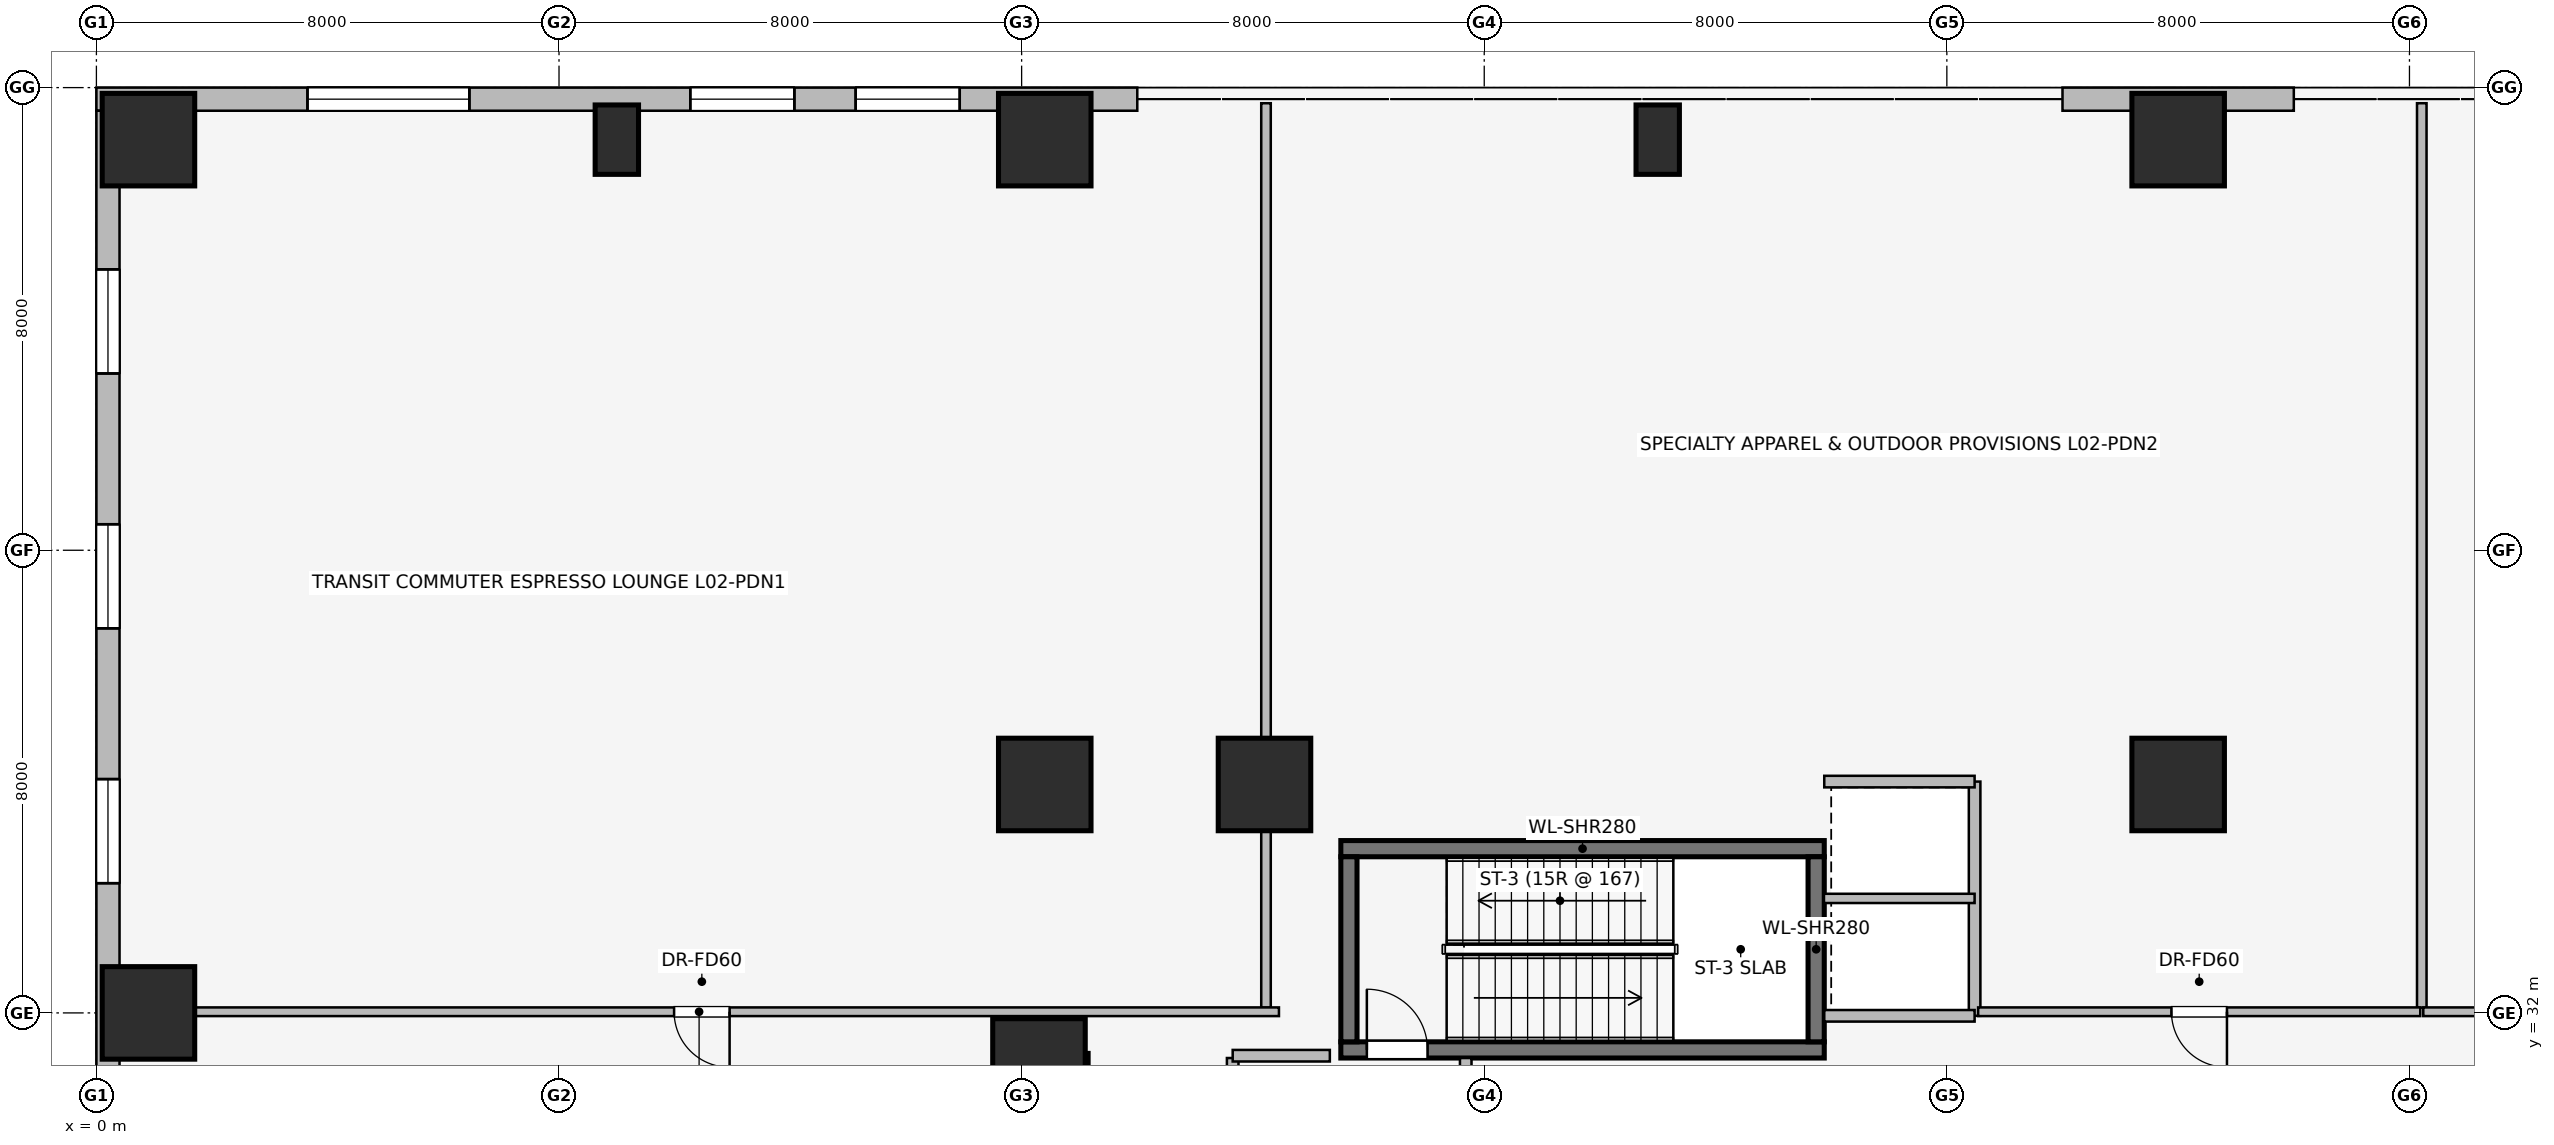
"""IFC4 building model, lengths in metres.
Left out: names, types, materials, properties, quantities, classifications, styles, units other than length and angle.
Written with IfcOpenShell. Run it as: python <this file> out.ifc"""

import sys

from ifc_helpers import new_model, si_unit, direction, frame, frame_2d, origin, origin_2d, place, context, subcontext, project, spatial, rectangle, extrude, element, fill, save


model = new_model("IFC4")
c1 = context("Model", 3, precision=1e-05, world=origin(), true_north=direction((0.0, 1.0)))
c2 = subcontext(c1, "Body", "Model", "MODEL_VIEW")
j1 = project(units=[si_unit("LENGTHUNIT", "METRE"), si_unit("PLANEANGLEUNIT", "RADIAN")], contexts=[c1])
p1 = place(None, origin())
s1 = spatial("IfcSite", under=j1, at=p1, CompositionType="ELEMENT")
p2 = place(p1, origin())
s2 = spatial("IfcBuilding", under=s1, at=p2, CompositionType="ELEMENT")
p3 = place(p2, frame((0.0, 0.0, 6.0)))
s3 = spatial("IfcBuildingStorey", under=s2, at=p3, CompositionType="ELEMENT", Elevation=6.0)
p4 = place(p3, frame((16.85, 25.68, 0.0), z_axis=(0.0, 0.0, 1.0), x_axis=(0.0, 1.0, 0.0)))
e1 = element("IfcWall", 1, at=p4, inside=s3, PredefinedType="SHEAR", context=c2, shape_type="SweptSolid", body=[
    extrude(rectangle(XDim=5.62, YDim=0.6, at=frame_2d((2.81, 0.0))), origin(), (0.0, 0.0, 1.0), 5.0),
])
p5 = place(p3, frame((21.52, 31.36, 0.0), z_axis=(0.0, 0.0, 1.0), x_axis=(1.0, 0.0, 0.0)))
e2 = element("IfcWall", 2, at=p5, inside=s3, PredefinedType="SHEAR", context=c2, shape_type="SweptSolid", body=[
    extrude(rectangle(XDim=8.36, YDim=0.28, at=frame_2d((4.18, 0.0))), origin(), (0.0, 0.0, 1.0), 5.0),
])
p6 = place(p5, frame((0.45, 0.0, 0.0)))
e3 = element("IfcOpeningElement", 3, at=p6, cuts=e2, PredefinedType="OPENING", context=c2, shape_type="SweptSolid", body=[
    extrude(rectangle(XDim=1.05, YDim=2.0, at=frame_2d((0.525, 1.0))), frame((0.0, 0.15, 0.0), z_axis=(0.0, -1.0, 0.0), x_axis=(1.0, 0.0, 0.0)), (0.0, 0.0, 1.0), 0.3),
])
p7 = place(p3, frame((29.88, 34.84, 0.0), z_axis=(0.0, 0.0, 1.0), x_axis=(-1.0, 0.0, 0.0)))
e4 = element("IfcWall", 4, at=p7, inside=s3, PredefinedType="SHEAR", context=c2, shape_type="SweptSolid", body=[
    extrude(rectangle(XDim=8.36, YDim=0.28, at=frame_2d((4.18, 0.0))), origin(), (0.0, 0.0, 1.0), 5.0),
])
for number, where, z_axis, x_axis in (
    (5, (21.66, 34.7, 0.0), (0.0, 0.0, 1.0), (0.0, -1.0, 0.0)),
    (6, (29.74, 31.5, 0.0), (0.0, 0.0, 1.0), (0.0, 1.0, 0.0)),
):
    element("IfcWall", number, at=place(p3, frame(where, z_axis=z_axis, x_axis=x_axis)), inside=s3, PredefinedType="SHEAR", context=c2, shape_type="SweptSolid", body=[
        extrude(rectangle(XDim=3.2, YDim=0.28, at=frame_2d((1.6, 0.0))), origin(), (0.0, 0.0, 1.0), 5.0),
    ])
for number, where, z_axis, x_axis in (
    (7, (16.3, 31.1, 0.0), (0.0, 0.0, 1.0), (1.0, 0.0, 0.0)),
    (8, (0.9, 47.1, 0.0), (0.0, 0.0, 1.0), (1.0, 0.0, 0.0)),
    (9, (16.4, 47.1, 0.0), (0.0, 0.0, 1.0), (1.0, 0.0, 0.0)),
    (10, (36.0, 47.1, 0.0), (0.0, 0.0, 1.0), (1.0, 0.0, 0.0)),
    (11, (0.9, 32.0, 0.0), (0.0, 0.0, 1.0), (1.0, 0.0, 0.0)),
    (12, (20.2, 35.95, 0.0), (0.0, 0.0, 1.0), (1.0, 0.0, 0.0)),
    (13, (16.4, 35.95, 0.0), (0.0, 0.0, 1.0), (1.0, 0.0, 0.0)),
    (14, (36.0, 35.95, 0.0), (0.0, 0.0, 1.0), (1.0, 0.0, 0.0)),
):
    element("IfcColumn", number, at=place(p3, frame(where, z_axis=z_axis, x_axis=x_axis)), inside=s3, PredefinedType="COLUMN", context=c2, shape_type="SweptSolid", body=[
        extrude(rectangle(XDim=1.6, YDim=1.6, at=origin_2d()), origin(), (0.0, 0.0, 1.0), 5.0),
    ])
for number, where, z_axis, x_axis in (
    (15, (9.0, 47.1, 0.0), (0.0, 0.0, 1.0), (1.0, 0.0, 0.0)),
    (16, (27.0, 47.1, 0.0), (0.0, 0.0, 1.0), (1.0, 0.0, 0.0)),
):
    element("IfcColumn", number, at=place(p3, frame(where, z_axis=z_axis, x_axis=x_axis)), inside=s3, PredefinedType="PILASTER", context=c2, shape_type="SweptSolid", body=[
        extrude(rectangle(XDim=0.75, YDim=1.2, at=origin_2d()), origin(), (0.0, 0.0, 1.0), 5.0),
    ])
p8 = place(p3, frame((0.0, 47.8, 0.0), z_axis=(0.0, 0.0, 1.0), x_axis=(1.0, 0.0, 0.0)))
e17 = element("IfcWall", 17, at=p8, inside=s3, PredefinedType="STANDARD", context=c2, shape_type="SweptSolid", body=[
    extrude(rectangle(XDim=18.0, YDim=0.4, at=frame_2d((9.0, 0.0))), origin(), (0.0, 0.0, 1.0), 4.69),
])
p9 = place(p8, frame((3.65, 0.0, 0.75)))
e18 = element("IfcOpeningElement", 18, at=p9, cuts=e17, PredefinedType="OPENING", context=c2, shape_type="SweptSolid", body=[
    extrude(rectangle(XDim=2.8, YDim=1.8, at=frame_2d((1.4, 0.9))), frame((0.0, 0.21, 0.0), z_axis=(0.0, -1.0, 0.0), x_axis=(1.0, 0.0, 0.0)), (0.0, 0.0, 1.0), 0.42),
])
p10 = place(p8, frame((10.27, 0.0, 0.75)))
e19 = element("IfcOpeningElement", 19, at=p10, cuts=e17, PredefinedType="OPENING", context=c2, shape_type="SweptSolid", body=[
    extrude(rectangle(XDim=1.8, YDim=1.5, at=frame_2d((0.9, 0.75))), frame((0.0, 0.21, 0.0), z_axis=(0.0, -1.0, 0.0), x_axis=(1.0, 0.0, 0.0)), (0.0, 0.0, 1.0), 0.42),
])
p11 = place(p8, frame((13.13, 0.0, 0.75)))
e20 = element("IfcOpeningElement", 20, at=p11, cuts=e17, PredefinedType="OPENING", context=c2, shape_type="SweptSolid", body=[
    extrude(rectangle(XDim=1.8, YDim=1.5, at=frame_2d((0.9, 0.75))), frame((0.0, 0.21, 0.0), z_axis=(0.0, -1.0, 0.0), x_axis=(1.0, 0.0, 0.0)), (0.0, 0.0, 1.0), 0.42),
])
p12 = place(p3, frame((34.0, 47.8, 0.0), z_axis=(0.0, 0.0, 1.0), x_axis=(1.0, 0.0, 0.0)))
e21 = element("IfcWall", 21, at=p12, inside=s3, PredefinedType="STANDARD", context=c2, shape_type="SweptSolid", body=[
    extrude(rectangle(XDim=4.0, YDim=0.4, at=frame_2d((2.0, 0.0))), origin(), (0.0, 0.0, 1.0), 4.69),
])
p13 = place(p3, frame((0.2, 24.0, 0.0), z_axis=(0.0, 0.0, 1.0), x_axis=(0.0, 1.0, 0.0)))
e22 = element("IfcWall", 22, at=p13, inside=s3, PredefinedType="STANDARD", context=c2, shape_type="SweptSolid", body=[
    extrude(rectangle(XDim=23.6, YDim=0.4, at=frame_2d((11.8, 0.0))), origin(), (0.0, 0.0, 1.0), 4.69),
])
p14 = place(p13, frame((0.778, 0.0, 0.75)))
e23 = element("IfcOpeningElement", 23, at=p14, cuts=e22, PredefinedType="OPENING", context=c2, shape_type="SweptSolid", body=[
    extrude(rectangle(XDim=2.8, YDim=1.8, at=frame_2d((1.4, 0.9))), frame((0.0, 0.21, 0.0), z_axis=(0.0, -1.0, 0.0), x_axis=(1.0, 0.0, 0.0)), (0.0, 0.0, 1.0), 0.42),
])
p15 = place(p13, frame((4.033, 0.0, 0.75)))
e24 = element("IfcOpeningElement", 24, at=p15, cuts=e22, PredefinedType="OPENING", context=c2, shape_type="SweptSolid", body=[
    extrude(rectangle(XDim=2.8, YDim=1.8, at=frame_2d((1.4, 0.9))), frame((0.0, 0.21, 0.0), z_axis=(0.0, -1.0, 0.0), x_axis=(1.0, 0.0, 0.0)), (0.0, 0.0, 1.0), 0.42),
])
p16 = place(p13, frame((10.243, 0.0, 0.75)))
e25 = element("IfcOpeningElement", 25, at=p16, cuts=e22, PredefinedType="OPENING", context=c2, shape_type="SweptSolid", body=[
    extrude(rectangle(XDim=1.8, YDim=1.5, at=frame_2d((0.9, 0.75))), frame((0.0, 0.21, 0.0), z_axis=(0.0, -1.0, 0.0), x_axis=(1.0, 0.0, 0.0)), (0.0, 0.0, 1.0), 0.42),
])
p17 = place(p13, frame((14.65, 0.0, 0.75)))
e26 = element("IfcOpeningElement", 26, at=p17, cuts=e22, PredefinedType="OPENING", context=c2, shape_type="SweptSolid", body=[
    extrude(rectangle(XDim=1.8, YDim=1.5, at=frame_2d((0.9, 0.75))), frame((0.0, 0.21, 0.0), z_axis=(0.0, -1.0, 0.0), x_axis=(1.0, 0.0, 0.0)), (0.0, 0.0, 1.0), 0.42),
])
p18 = place(p13, frame((19.057, 0.0, 0.75)))
e27 = element("IfcOpeningElement", 27, at=p18, cuts=e22, PredefinedType="OPENING", context=c2, shape_type="SweptSolid", body=[
    extrude(rectangle(XDim=1.8, YDim=1.5, at=frame_2d((0.9, 0.75))), frame((0.0, 0.21, 0.0), z_axis=(0.0, -1.0, 0.0), x_axis=(1.0, 0.0, 0.0)), (0.0, 0.0, 1.0), 0.42),
])
p19 = place(p3, frame((19.65, 25.68, 0.0), z_axis=(0.0, 0.0, 1.0), x_axis=(0.0, 1.0, 0.0)))
e28 = element("IfcWall", 28, at=p19, inside=s3, PredefinedType="PARTITIONING", context=c2, shape_type="SweptSolid", body=[
    extrude(rectangle(XDim=5.54, YDim=0.2, at=frame_2d((2.77, 0.0))), origin(), (0.0, 0.0, 1.0), 4.69),
])
p20 = place(p19, frame((0.62, 0.0, 0.0)))
e29 = element("IfcOpeningElement", 29, at=p20, cuts=e28, PredefinedType="OPENING", context=c2, shape_type="SweptSolid", body=[
    extrude(rectangle(XDim=1.1, YDim=2.2, at=frame_2d((0.55, 1.1))), frame((0.0, 0.11, 0.0), z_axis=(0.0, -1.0, 0.0), x_axis=(1.0, 0.0, 0.0)), (0.0, 0.0, 1.0), 0.22),
])
p21 = place(p19, frame((3.12, 0.0, 0.0)))
e30 = element("IfcOpeningElement", 30, at=p21, cuts=e28, PredefinedType="OPENING", context=c2, shape_type="SweptSolid", body=[
    extrude(rectangle(XDim=1.1, YDim=2.2, at=frame_2d((0.55, 1.1))), frame((0.0, 0.11, 0.0), z_axis=(0.0, -1.0, 0.0), x_axis=(1.0, 0.0, 0.0)), (0.0, 0.0, 1.0), 0.22),
])
p22 = place(p3, frame((23.68, 25.68, 0.0), z_axis=(0.0, 0.0, 1.0), x_axis=(0.0, 1.0, 0.0)))
e31 = element("IfcWall", 31, at=p22, inside=s3, PredefinedType="PARTITIONING", context=c2, shape_type="SweptSolid", body=[
    extrude(rectangle(XDim=5.54, YDim=0.2, at=frame_2d((2.77, 0.0))), origin(), (0.0, 0.0, 1.0), 4.69),
])
p23 = place(p22, frame((1.8, 0.0, 0.0)))
e32 = element("IfcOpeningElement", 32, at=p23, cuts=e31, PredefinedType="OPENING", context=c2, shape_type="SweptSolid", body=[
    extrude(rectangle(XDim=1.05, YDim=2.0, at=frame_2d((0.525, 1.0))), frame((0.0, 0.11, 0.0), z_axis=(0.0, -1.0, 0.0), x_axis=(1.0, 0.0, 0.0)), (0.0, 0.0, 1.0), 0.22),
])
p24 = place(p3, frame((21.33, 31.26, 0.0), z_axis=(0.0, 0.0, 1.0), x_axis=(-1.0, 0.0, 0.0)))
e33 = element("IfcWall", 33, at=p24, inside=s3, PredefinedType="PARTITIONING", context=c2, shape_type="SweptSolid", body=[
    extrude(rectangle(XDim=1.68, YDim=0.2, at=frame_2d((0.84, 0.0))), origin(), (0.0, 0.0, 1.0), 4.69),
])
p25 = place(p3, frame((32.48, 31.95, 0.0), z_axis=(0.0, 0.0, 1.0), x_axis=(0.0, 1.0, 0.0)))
e34 = element("IfcWall", 34, at=p25, inside=s3, PredefinedType="PARTITIONING", context=c2, shape_type="SweptSolid", body=[
    extrude(rectangle(XDim=4.05, YDim=0.2, at=frame_2d((2.025, 0.0))), origin(), (0.0, 0.0, 1.0), 4.69),
])
p26 = place(p3, frame((29.88, 36.0, 0.0), z_axis=(0.0, 0.0, 1.0), x_axis=(1.0, 0.0, 0.0)))
e35 = element("IfcWall", 35, at=p26, inside=s3, PredefinedType="PARTITIONING", context=c2, shape_type="SweptSolid", body=[
    extrude(rectangle(XDim=2.6, YDim=0.2, at=frame_2d((1.3, 0.0))), origin(), (0.0, 0.0, 1.0), 3.742),
])
p27 = place(p3, frame((32.48, 31.95, 0.0), z_axis=(0.0, 0.0, 1.0), x_axis=(-1.0, 0.0, 0.0)))
e36 = element("IfcWall", 36, at=p27, inside=s3, PredefinedType="PARTITIONING", context=c2, shape_type="SweptSolid", body=[
    extrude(rectangle(XDim=2.6, YDim=0.2, at=frame_2d((1.3, 0.0))), origin(), (0.0, 0.0, 1.0), 4.69),
])
p28 = place(p3, frame((29.875, 33.98, 0.0), z_axis=(0.0, 0.0, 1.0), x_axis=(1.0, 0.0, 0.0)))
e37 = element("IfcWall", 37, at=p28, inside=s3, PredefinedType="PARTITIONING", context=c2, shape_type="SweptSolid", body=[
    extrude(rectangle(XDim=2.605, YDim=0.16, at=frame_2d((1.302, 0.0))), origin(), (0.0, 0.0, 1.0), 4.69),
])
p29 = place(p3, frame((20.226, 32.09, 0.0), z_axis=(0.0, 0.0, 1.0), x_axis=(0.0, 1.0, 0.0)))
e38 = element("IfcWall", 38, at=p29, inside=s3, PredefinedType="PARTITIONING", context=c2, shape_type="SweptSolid", body=[
    extrude(rectangle(XDim=15.64, YDim=0.165, at=frame_2d((7.82, 0.0))), origin(), (0.0, 0.0, 1.0), 4.69),
])
p30 = place(p3, frame((40.213, 32.09, 0.0), z_axis=(0.0, 0.0, 1.0), x_axis=(0.0, 1.0, 0.0)))
e39 = element("IfcWall", 39, at=p30, inside=s3, PredefinedType="PARTITIONING", context=c2, shape_type="SweptSolid", body=[
    extrude(rectangle(XDim=15.64, YDim=0.165, at=frame_2d((7.82, 0.0))), origin(), (0.0, 0.0, 1.0), 4.082),
])
p31 = place(p3, frame((20.45, 32.02, 0.0), z_axis=(0.0, 0.0, 1.0), x_axis=(-1.0, 0.0, 0.0)))
e40 = element("IfcWall", 40, at=p31, inside=s3, PredefinedType="PARTITIONING", context=c2, shape_type="SweptSolid", body=[
    extrude(rectangle(XDim=20.055, YDim=0.15, at=frame_2d((10.027, 0.0))), origin(), (0.0, 0.0, 1.0), 3.742),
])
p32 = place(p31, frame((9.5, 0.0, 0.0)))
e41 = element("IfcOpeningElement", 41, at=p32, cuts=e40, PredefinedType="OPENING", context=c2, shape_type="SweptSolid", body=[
    extrude(rectangle(XDim=0.96, YDim=2.0, at=frame_2d((0.48, 1.0))), frame((0.0, 0.085, 0.0), z_axis=(0.0, -1.0, 0.0), x_axis=(1.0, 0.0, 0.0)), (0.0, 0.0, 1.0), 0.17),
])
p33 = place(p3, frame((40.187, 32.02, 0.0), z_axis=(0.0, 0.0, 1.0), x_axis=(-1.0, 0.0, 0.0)))
e42 = element("IfcWall", 42, at=p33, inside=s3, PredefinedType="PARTITIONING", context=c2, shape_type="SweptSolid", body=[
    extrude(rectangle(XDim=7.646, YDim=0.15, at=frame_2d((3.823, 0.0))), origin(), (0.0, 0.0, 1.0), 4.69),
])
p34 = place(p33, frame((3.343, 0.0, 0.0)))
e43 = element("IfcOpeningElement", 43, at=p34, cuts=e42, PredefinedType="OPENING", context=c2, shape_type="SweptSolid", body=[
    extrude(rectangle(XDim=0.96, YDim=2.0, at=frame_2d((0.48, 1.0))), frame((0.0, 0.085, 0.0), z_axis=(0.0, -1.0, 0.0), x_axis=(1.0, 0.0, 0.0)), (0.0, 0.0, 1.0), 0.17),
])
p35 = place(p3, frame((57.214, 32.02, 0.0), z_axis=(0.0, 0.0, 1.0), x_axis=(-1.0, 0.0, 0.0)))
e44 = element("IfcWall", 44, at=p35, inside=s3, PredefinedType="PARTITIONING", context=c2, shape_type="SweptSolid", body=[
    extrude(rectangle(XDim=16.975, YDim=0.15, at=frame_2d((8.488, 0.0))), origin(), (0.0, 0.0, 1.0), 3.742),
])
p36 = place(p35, frame((7.956, 0.0, 0.0)))
e45 = element("IfcOpeningElement", 45, at=p36, cuts=e44, PredefinedType="OPENING", context=c2, shape_type="SweptSolid", body=[
    extrude(rectangle(XDim=0.96, YDim=2.0, at=frame_2d((0.48, 1.0))), frame((0.0, 0.085, 0.0), z_axis=(0.0, -1.0, 0.0), x_axis=(1.0, 0.0, 0.0)), (0.0, 0.0, 1.0), 0.17),
])
p37 = place(p9, origin())
e46 = element("IfcWindow", 46, at=p37, inside=s3, PartitioningType="SINGLE_PANEL", PredefinedType="WINDOW", context=c2, shape_type="SweptSolid", body=[
    extrude(rectangle(XDim=2.8, YDim=1.8, at=frame_2d((1.4, 0.9))), frame((0.0, 0.03, 0.0), z_axis=(0.0, -1.0, 0.0), x_axis=(1.0, 0.0, 0.0)), (0.0, 0.0, 1.0), 0.06),
])
fill(e18, e46)
p38 = place(p10, origin())
e47 = element("IfcWindow", 47, at=p38, inside=s3, PartitioningType="SINGLE_PANEL", PredefinedType="WINDOW", context=c2, shape_type="SweptSolid", body=[
    extrude(rectangle(XDim=1.8, YDim=1.5, at=frame_2d((0.9, 0.75))), frame((0.0, 0.03, 0.0), z_axis=(0.0, -1.0, 0.0), x_axis=(1.0, 0.0, 0.0)), (0.0, 0.0, 1.0), 0.06),
])
fill(e19, e47)
p39 = place(p11, origin())
e48 = element("IfcWindow", 48, at=p39, inside=s3, PartitioningType="SINGLE_PANEL", PredefinedType="WINDOW", context=c2, shape_type="SweptSolid", body=[
    extrude(rectangle(XDim=1.8, YDim=1.5, at=frame_2d((0.9, 0.75))), frame((0.0, 0.03, 0.0), z_axis=(0.0, -1.0, 0.0), x_axis=(1.0, 0.0, 0.0)), (0.0, 0.0, 1.0), 0.06),
])
fill(e20, e48)
p40 = place(p16, origin())
e49 = element("IfcWindow", 49, at=p40, inside=s3, PartitioningType="SINGLE_PANEL", PredefinedType="WINDOW", context=c2, shape_type="SweptSolid", body=[
    extrude(rectangle(XDim=1.8, YDim=1.5, at=frame_2d((0.9, 0.75))), frame((0.0, 0.03, 0.0), z_axis=(0.0, -1.0, 0.0), x_axis=(1.0, 0.0, 0.0)), (0.0, 0.0, 1.0), 0.06),
])
fill(e25, e49)
p41 = place(p17, origin())
e50 = element("IfcWindow", 50, at=p41, inside=s3, PartitioningType="SINGLE_PANEL", PredefinedType="WINDOW", context=c2, shape_type="SweptSolid", body=[
    extrude(rectangle(XDim=1.8, YDim=1.5, at=frame_2d((0.9, 0.75))), frame((0.0, 0.03, 0.0), z_axis=(0.0, -1.0, 0.0), x_axis=(1.0, 0.0, 0.0)), (0.0, 0.0, 1.0), 0.06),
])
fill(e26, e50)
p42 = place(p18, origin())
e51 = element("IfcWindow", 51, at=p42, inside=s3, PartitioningType="SINGLE_PANEL", PredefinedType="WINDOW", context=c2, shape_type="SweptSolid", body=[
    extrude(rectangle(XDim=1.8, YDim=1.5, at=frame_2d((0.9, 0.75))), frame((0.0, 0.03, 0.0), z_axis=(0.0, -1.0, 0.0), x_axis=(1.0, 0.0, 0.0)), (0.0, 0.0, 1.0), 0.06),
])
fill(e27, e51)
p43 = place(p6, origin())
e52 = element("IfcDoor", 52, at=p43, inside=s3, OperationType="SINGLE_SWING_LEFT", PredefinedType="DOOR", context=c2, shape_type="SweptSolid", body=[
    extrude(rectangle(XDim=1.05, YDim=2.0, at=frame_2d((0.525, 1.0))), frame((0.0, 0.025, 0.0), z_axis=(0.0, -1.0, 0.0), x_axis=(1.0, 0.0, 0.0)), (0.0, 0.0, 1.0), 0.05),
])
fill(e3, e52)
p44 = place(p32, origin())
e53 = element("IfcDoor", 53, at=p44, inside=s3, OperationType="SINGLE_SWING_LEFT", PredefinedType="DOOR", context=c2, shape_type="SweptSolid", body=[
    extrude(rectangle(XDim=0.96, YDim=2.0, at=frame_2d((0.48, 1.0))), frame((0.0, 0.025, 0.0), z_axis=(0.0, -1.0, 0.0), x_axis=(1.0, 0.0, 0.0)), (0.0, 0.0, 1.0), 0.05),
])
fill(e41, e53)
p45 = place(p34, origin())
e54 = element("IfcDoor", 54, at=p45, inside=s3, OperationType="SINGLE_SWING_LEFT", PredefinedType="DOOR", context=c2, shape_type="SweptSolid", body=[
    extrude(rectangle(XDim=0.96, YDim=2.0, at=frame_2d((0.48, 1.0))), frame((0.0, 0.025, 0.0), z_axis=(0.0, -1.0, 0.0), x_axis=(1.0, 0.0, 0.0)), (0.0, 0.0, 1.0), 0.05),
])
fill(e43, e54)
save(model, sys.argv[1])
